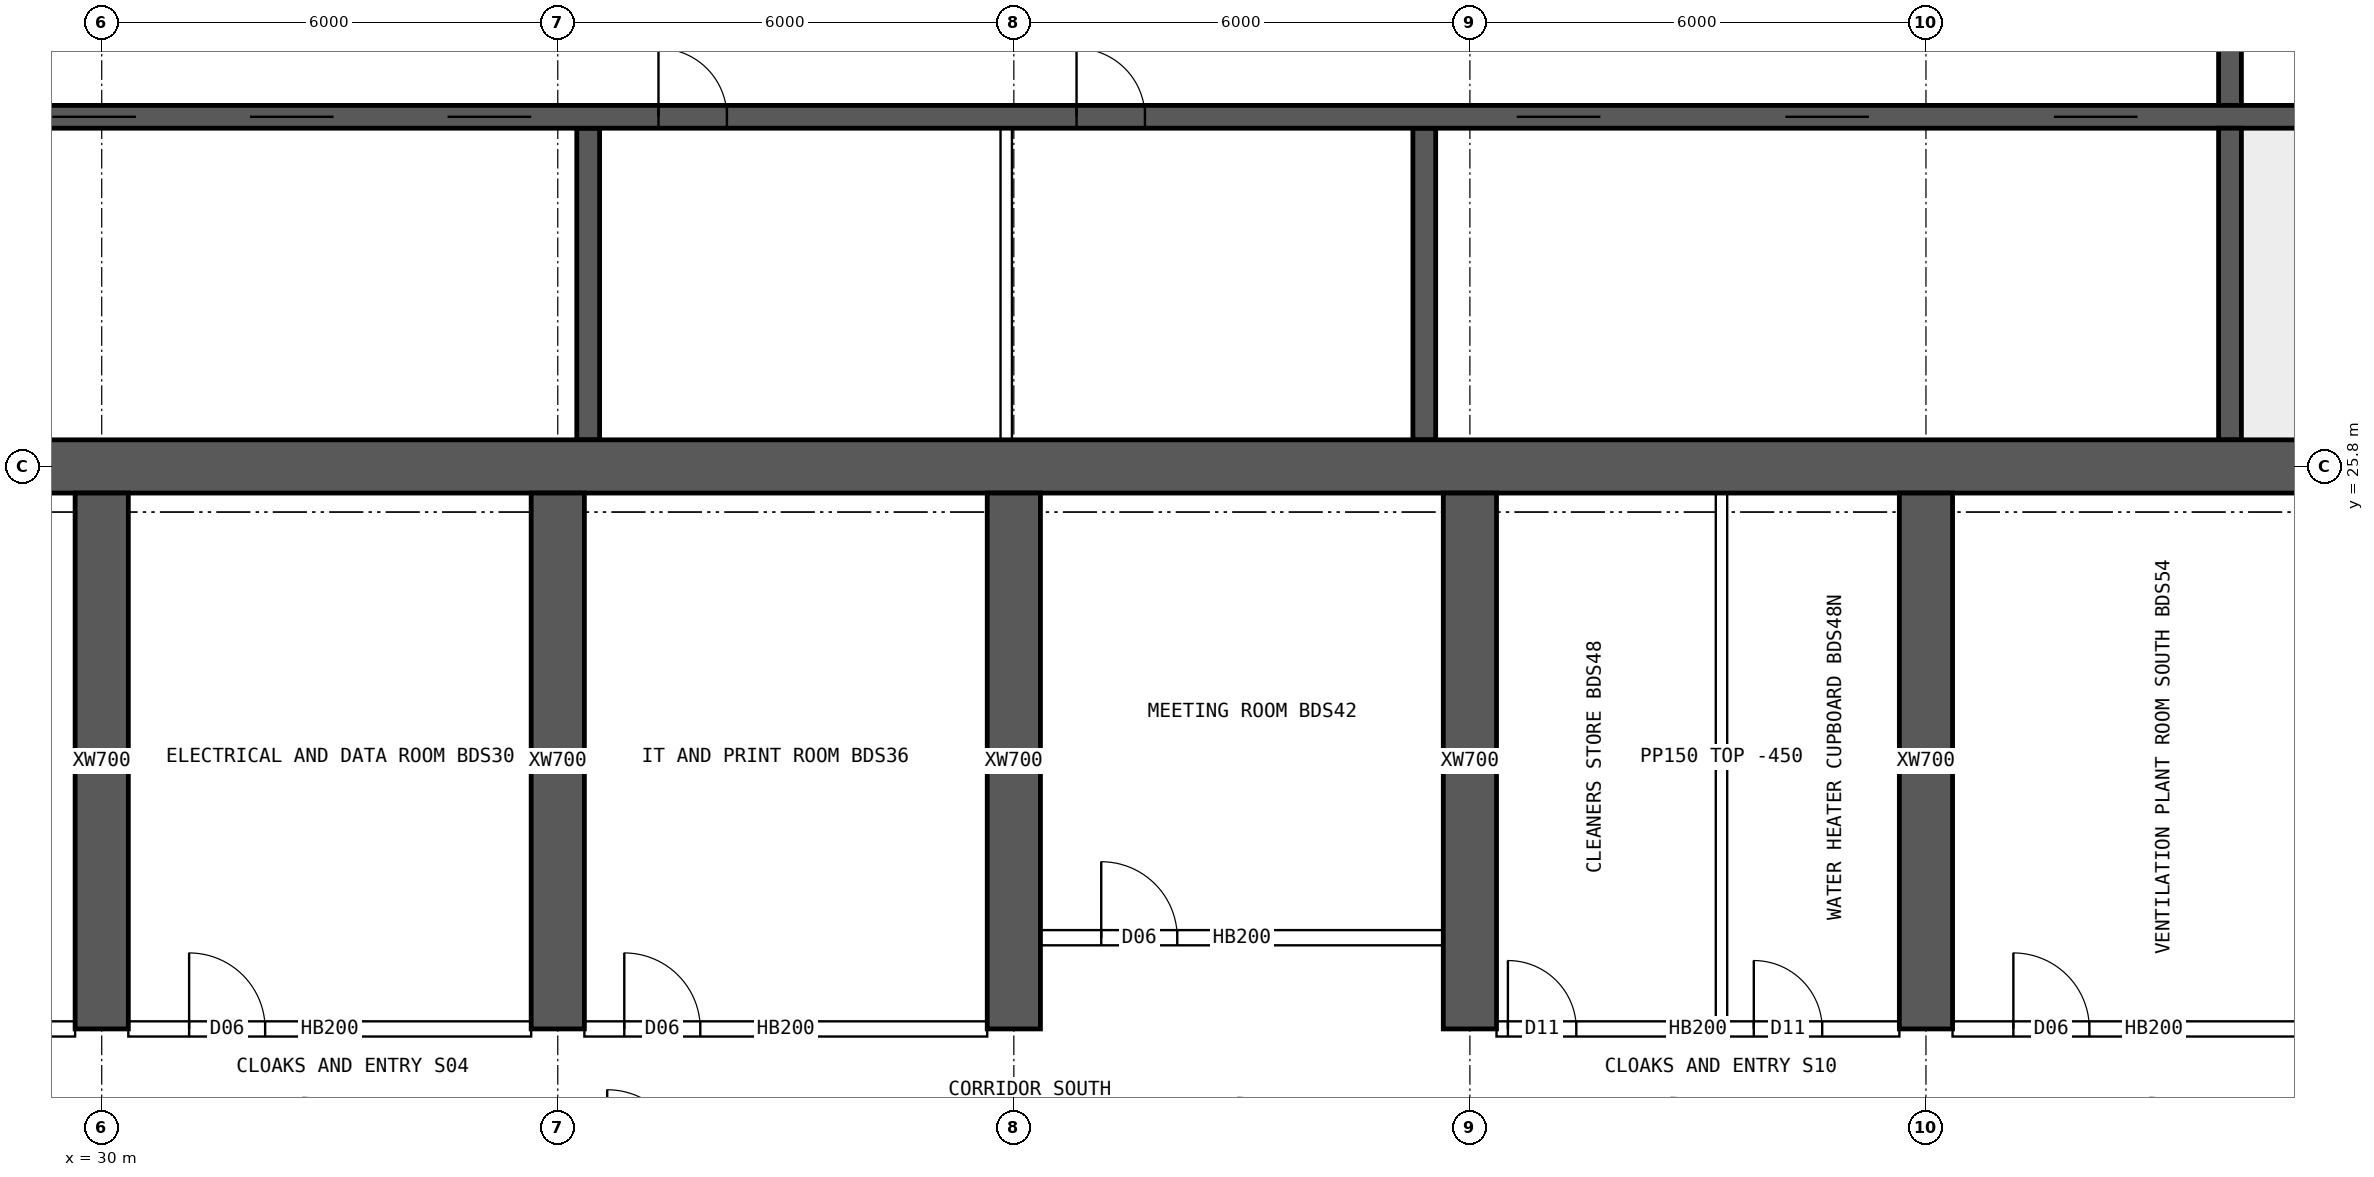
"""IFC4 building model, lengths in metres.
Left out: names, types, materials, properties, quantities, classifications, styles, units other than length and angle.
Written with IfcOpenShell. Run it as: python <this file> out.ifc"""

import sys

from ifc_helpers import new_model, si_unit, direction, frame, frame_2d, origin, place, context, subcontext, project, spatial, rectangle, extrude, element, fill, save


model = new_model("IFC4")
c1 = context("Model", 3, precision=1e-05, world=origin(), true_north=direction((0.0, 1.0)))
c2 = subcontext(c1, "Body", "Model", "MODEL_VIEW")
j1 = project(units=[si_unit("LENGTHUNIT", "METRE"), si_unit("PLANEANGLEUNIT", "RADIAN")], contexts=[c1])
p1 = place(None, origin())
s1 = spatial("IfcSite", under=j1, at=p1, CompositionType="ELEMENT")
p2 = place(p1, origin())
s2 = spatial("IfcBuilding", under=s1, at=p2, CompositionType="ELEMENT")
p3 = place(p2, frame((0.0, 0.0, 227.8)))
s3 = spatial("IfcBuildingStorey", under=s2, at=p3, CompositionType="ELEMENT", Elevation=227.8)
p4 = place(p3, frame((18.0, 25.8, 0.0), z_axis=(0.0, 0.0, 1.0), x_axis=(1.0, 0.0, 0.0)))
e1 = element("IfcWall", 1, at=p4, inside=s3, PredefinedType="SHEAR", context=c2, shape_type="SweptSolid", body=[
    extrude(rectangle(XDim=48.0, YDim=0.7, at=frame_2d((24.0, 0.0))), origin(), (0.0, 0.0, 1.0), 3.75),
])
p5 = place(p3, frame((18.35, 30.4, 0.0), z_axis=(0.0, 0.0, 1.0), x_axis=(1.0, 0.0, 0.0)))
e2 = element("IfcWall", 2, at=p5, inside=s3, PredefinedType="SHEAR", context=c2, shape_type="SweptSolid", body=[
    extrude(rectangle(XDim=47.3, YDim=0.3, at=frame_2d((23.65, 0.0))), origin(), (0.0, 0.0, 1.0), 3.75),
])
p6 = place(p5, frame((0.4, 0.0, 0.0)))
e3 = element("IfcOpeningElement", 3, at=p6, cuts=e2, PredefinedType="OPENING", context=c2, shape_type="SweptSolid", body=[
    extrude(rectangle(XDim=1.0, YDim=2.1, at=frame_2d((0.5, 1.05))), frame((0.0, 0.16, 0.0), z_axis=(0.0, -1.0, 0.0), x_axis=(1.0, 0.0, 0.0)), (0.0, 0.0, 1.0), 0.32),
])
p7 = place(p5, frame((45.9, 0.0, 0.0)))
e4 = element("IfcOpeningElement", 4, at=p7, cuts=e2, PredefinedType="OPENING", context=c2, shape_type="SweptSolid", body=[
    extrude(rectangle(XDim=1.0, YDim=2.1, at=frame_2d((0.5, 1.05))), frame((0.0, 0.16, 0.0), z_axis=(0.0, -1.0, 0.0), x_axis=(1.0, 0.0, 0.0)), (0.0, 0.0, 1.0), 0.32),
])
p8 = place(p5, frame((8.4, 0.0, 0.0)))
e5 = element("IfcOpeningElement", 5, at=p8, cuts=e2, PredefinedType="OPENING", context=c2, shape_type="SweptSolid", body=[
    extrude(rectangle(XDim=1.1, YDim=2.1, at=frame_2d((0.55, 1.05))), frame((0.0, 0.16, 0.0), z_axis=(0.0, -1.0, 0.0), x_axis=(1.0, 0.0, 0.0)), (0.0, 0.0, 1.0), 0.32),
])
p9 = place(p5, frame((11.0, 0.0, 0.0)))
e6 = element("IfcOpeningElement", 6, at=p9, cuts=e2, PredefinedType="OPENING", context=c2, shape_type="SweptSolid", body=[
    extrude(rectangle(XDim=1.1, YDim=2.1, at=frame_2d((0.55, 1.05))), frame((0.0, 0.16, 0.0), z_axis=(0.0, -1.0, 0.0), x_axis=(1.0, 0.0, 0.0)), (0.0, 0.0, 1.0), 0.32),
])
p10 = place(p5, frame((13.6, 0.0, 0.0)))
e7 = element("IfcOpeningElement", 7, at=p10, cuts=e2, PredefinedType="OPENING", context=c2, shape_type="SweptSolid", body=[
    extrude(rectangle(XDim=1.1, YDim=2.1, at=frame_2d((0.55, 1.05))), frame((0.0, 0.16, 0.0), z_axis=(0.0, -1.0, 0.0), x_axis=(1.0, 0.0, 0.0)), (0.0, 0.0, 1.0), 0.32),
])
p11 = place(p5, frame((16.2, 0.0, 0.0)))
e8 = element("IfcOpeningElement", 8, at=p11, cuts=e2, PredefinedType="OPENING", context=c2, shape_type="SweptSolid", body=[
    extrude(rectangle(XDim=1.1, YDim=2.1, at=frame_2d((0.55, 1.05))), frame((0.0, 0.16, 0.0), z_axis=(0.0, -1.0, 0.0), x_axis=(1.0, 0.0, 0.0)), (0.0, 0.0, 1.0), 0.32),
])
p12 = place(p5, frame((18.975, 0.0, 0.0)))
e9 = element("IfcOpeningElement", 9, at=p12, cuts=e2, PredefinedType="OPENING", context=c2, shape_type="SweptSolid", body=[
    extrude(rectangle(XDim=0.9, YDim=2.1, at=frame_2d((0.45, 1.05))), frame((0.0, 0.16, 0.0), z_axis=(0.0, -1.0, 0.0), x_axis=(1.0, 0.0, 0.0)), (0.0, 0.0, 1.0), 0.32),
])
p13 = place(p5, frame((24.475, 0.0, 0.0)))
e10 = element("IfcOpeningElement", 10, at=p13, cuts=e2, PredefinedType="OPENING", context=c2, shape_type="SweptSolid", body=[
    extrude(rectangle(XDim=0.9, YDim=2.1, at=frame_2d((0.45, 1.05))), frame((0.0, 0.16, 0.0), z_axis=(0.0, -1.0, 0.0), x_axis=(1.0, 0.0, 0.0)), (0.0, 0.0, 1.0), 0.32),
])
p14 = place(p5, frame((30.267, 0.0, 0.0)))
e11 = element("IfcOpeningElement", 11, at=p14, cuts=e2, PredefinedType="OPENING", context=c2, shape_type="SweptSolid", body=[
    extrude(rectangle(XDim=1.1, YDim=2.1, at=frame_2d((0.55, 1.05))), frame((0.0, 0.16, 0.0), z_axis=(0.0, -1.0, 0.0), x_axis=(1.0, 0.0, 0.0)), (0.0, 0.0, 1.0), 0.32),
])
p15 = place(p5, frame((33.8, 0.0, 0.0)))
e12 = element("IfcOpeningElement", 12, at=p15, cuts=e2, PredefinedType="OPENING", context=c2, shape_type="SweptSolid", body=[
    extrude(rectangle(XDim=1.1, YDim=2.1, at=frame_2d((0.55, 1.05))), frame((0.0, 0.16, 0.0), z_axis=(0.0, -1.0, 0.0), x_axis=(1.0, 0.0, 0.0)), (0.0, 0.0, 1.0), 0.32),
])
p16 = place(p5, frame((37.333, 0.0, 0.0)))
e13 = element("IfcOpeningElement", 13, at=p16, cuts=e2, PredefinedType="OPENING", context=c2, shape_type="SweptSolid", body=[
    extrude(rectangle(XDim=1.1, YDim=2.1, at=frame_2d((0.55, 1.05))), frame((0.0, 0.16, 0.0), z_axis=(0.0, -1.0, 0.0), x_axis=(1.0, 0.0, 0.0)), (0.0, 0.0, 1.0), 0.32),
])
p17 = place(p3, frame((58.0, 26.15, 0.0), z_axis=(0.0, 0.0, 1.0), x_axis=(0.0, 1.0, 0.0)))
e14 = element("IfcWall", 14, at=p17, inside=s3, PredefinedType="SHEAR", context=c2, shape_type="SweptSolid", body=[
    extrude(rectangle(XDim=4.1, YDim=0.3, at=frame_2d((2.05, 0.0))), origin(), (0.0, 0.0, 1.0), 3.75),
])
p18 = place(p3, frame((58.0, 30.55, 0.0), z_axis=(0.0, 0.0, 1.0), x_axis=(0.0, 1.0, 0.0)))
e15 = element("IfcWall", 15, at=p18, inside=s3, PredefinedType="SHEAR", context=c2, shape_type="SweptSolid", body=[
    extrude(rectangle(XDim=3.9, YDim=0.3, at=frame_2d((1.95, 0.0))), origin(), (0.0, 0.0, 1.0), 3.75),
])
p19 = place(p18, frame((1.4, 0.0, 0.0)))
e16 = element("IfcOpeningElement", 16, at=p19, cuts=e15, PredefinedType="OPENING", context=c2, shape_type="SweptSolid", body=[
    extrude(rectangle(XDim=1.2, YDim=2.1, at=frame_2d((0.6, 1.05))), frame((0.0, 0.16, 0.0), z_axis=(0.0, -1.0, 0.0), x_axis=(1.0, 0.0, 0.0)), (0.0, 0.0, 1.0), 0.32),
])
for number, where, z_axis, x_axis in (
    (17, (36.4, 26.15, 0.0), (0.0, 0.0, 1.0), (0.0, 1.0, 0.0)),
    (18, (47.4, 26.15, 0.0), (0.0, 0.0, 1.0), (0.0, 1.0, 0.0)),
):
    element("IfcWall", number, at=place(p3, frame(where, z_axis=z_axis, x_axis=x_axis)), inside=s3, PredefinedType="SHEAR", context=c2, shape_type="SweptSolid", body=[
        extrude(rectangle(XDim=4.1, YDim=0.3, at=frame_2d((2.05, 0.0))), origin(), (0.0, 0.0, 1.0), 3.75),
    ])
for number, where, z_axis, x_axis in (
    (19, (30.0, 18.4, 0.0), (0.0, 0.0, 1.0), (0.0, 1.0, 0.0)),
    (20, (36.0, 18.4, 0.0), (0.0, 0.0, 1.0), (0.0, 1.0, 0.0)),
    (21, (42.0, 18.4, 0.0), (0.0, 0.0, 1.0), (0.0, 1.0, 0.0)),
    (22, (48.0, 18.4, 0.0), (0.0, 0.0, 1.0), (0.0, 1.0, 0.0)),
    (23, (54.0, 18.4, 0.0), (0.0, 0.0, 1.0), (0.0, 1.0, 0.0)),
):
    element("IfcWall", number, at=place(p3, frame(where, z_axis=z_axis, x_axis=x_axis)), inside=s3, PredefinedType="SHEAR", context=c2, shape_type="SweptSolid", body=[
        extrude(rectangle(XDim=7.05, YDim=0.7, at=frame_2d((3.525, 0.0))), origin(), (0.0, 0.0, 1.0), 3.75),
    ])
p20 = place(p3, frame((41.9, 26.15, 0.0), z_axis=(0.0, 0.0, 1.0), x_axis=(0.0, 1.0, 0.0)))
e24 = element("IfcWall", 24, at=p20, inside=s3, PredefinedType="SOLIDWALL", context=c2, shape_type="SweptSolid", body=[
    extrude(rectangle(XDim=4.1, YDim=0.15, at=frame_2d((2.05, 0.0))), origin(), (0.0, 0.0, 1.0), 3.3),
])
p21 = place(p3, frame((24.35, 18.4, 0.0), z_axis=(0.0, 0.0, 1.0), x_axis=(1.0, 0.0, 0.0)))
e25 = element("IfcWall", 25, at=p21, inside=s3, PredefinedType="SOLIDWALL", context=c2, shape_type="SweptSolid", body=[
    extrude(rectangle(XDim=5.3, YDim=0.2, at=frame_2d((2.65, 0.0))), origin(), (0.0, 0.0, 1.0), 3.3),
])
p22 = place(p21, frame((0.15, 0.0, 0.0)))
e26 = element("IfcOpeningElement", 26, at=p22, cuts=e25, PredefinedType="OPENING", context=c2, shape_type="SweptSolid", body=[
    extrude(rectangle(XDim=0.9, YDim=2.1, at=frame_2d((0.45, 1.05))), frame((0.0, 0.11, 0.0), z_axis=(0.0, -1.0, 0.0), x_axis=(1.0, 0.0, 0.0)), (0.0, 0.0, 1.0), 0.22),
])
p23 = place(p21, frame((2.22, 0.0, 0.0)))
e27 = element("IfcOpeningElement", 27, at=p23, cuts=e25, PredefinedType="OPENING", context=c2, shape_type="SweptSolid", body=[
    extrude(rectangle(XDim=0.9, YDim=2.1, at=frame_2d((0.45, 1.05))), frame((0.0, 0.11, 0.0), z_axis=(0.0, -1.0, 0.0), x_axis=(1.0, 0.0, 0.0)), (0.0, 0.0, 1.0), 0.22),
])
p24 = place(p3, frame((30.35, 18.4, 0.0), z_axis=(0.0, 0.0, 1.0), x_axis=(1.0, 0.0, 0.0)))
e28 = element("IfcWall", 28, at=p24, inside=s3, PredefinedType="SOLIDWALL", context=c2, shape_type="SweptSolid", body=[
    extrude(rectangle(XDim=5.3, YDim=0.2, at=frame_2d((2.65, 0.0))), origin(), (0.0, 0.0, 1.0), 3.3),
])
p25 = place(p24, frame((0.8, 0.0, 0.0)))
e29 = element("IfcOpeningElement", 29, at=p25, cuts=e28, PredefinedType="OPENING", context=c2, shape_type="SweptSolid", body=[
    extrude(rectangle(XDim=1.0, YDim=2.1, at=frame_2d((0.5, 1.05))), frame((0.0, 0.11, 0.0), z_axis=(0.0, -1.0, 0.0), x_axis=(1.0, 0.0, 0.0)), (0.0, 0.0, 1.0), 0.22),
])
p26 = place(p3, frame((36.35, 18.4, 0.0), z_axis=(0.0, 0.0, 1.0), x_axis=(1.0, 0.0, 0.0)))
e30 = element("IfcWall", 30, at=p26, inside=s3, PredefinedType="SOLIDWALL", context=c2, shape_type="SweptSolid", body=[
    extrude(rectangle(XDim=5.3, YDim=0.2, at=frame_2d((2.65, 0.0))), origin(), (0.0, 0.0, 1.0), 3.3),
])
p27 = place(p26, frame((0.525, 0.0, 0.0)))
e31 = element("IfcOpeningElement", 31, at=p27, cuts=e30, PredefinedType="OPENING", context=c2, shape_type="SweptSolid", body=[
    extrude(rectangle(XDim=1.0, YDim=2.1, at=frame_2d((0.5, 1.05))), frame((0.0, 0.11, 0.0), z_axis=(0.0, -1.0, 0.0), x_axis=(1.0, 0.0, 0.0)), (0.0, 0.0, 1.0), 0.22),
])
p28 = place(p3, frame((48.35, 18.4, 0.0), z_axis=(0.0, 0.0, 1.0), x_axis=(1.0, 0.0, 0.0)))
e32 = element("IfcWall", 32, at=p28, inside=s3, PredefinedType="SOLIDWALL", context=c2, shape_type="SweptSolid", body=[
    extrude(rectangle(XDim=5.3, YDim=0.2, at=frame_2d((2.65, 0.0))), origin(), (0.0, 0.0, 1.0), 3.3),
])
p29 = place(p28, frame((0.15, 0.0, 0.0)))
e33 = element("IfcOpeningElement", 33, at=p29, cuts=e32, PredefinedType="OPENING", context=c2, shape_type="SweptSolid", body=[
    extrude(rectangle(XDim=0.9, YDim=2.1, at=frame_2d((0.45, 1.05))), frame((0.0, 0.11, 0.0), z_axis=(0.0, -1.0, 0.0), x_axis=(1.0, 0.0, 0.0)), (0.0, 0.0, 1.0), 0.22),
])
p30 = place(p28, frame((3.385, 0.0, 0.0)))
e34 = element("IfcOpeningElement", 34, at=p30, cuts=e32, PredefinedType="OPENING", context=c2, shape_type="SweptSolid", body=[
    extrude(rectangle(XDim=0.9, YDim=2.1, at=frame_2d((0.45, 1.05))), frame((0.0, 0.11, 0.0), z_axis=(0.0, -1.0, 0.0), x_axis=(1.0, 0.0, 0.0)), (0.0, 0.0, 1.0), 0.22),
])
p31 = place(p3, frame((54.35, 18.4, 0.0), z_axis=(0.0, 0.0, 1.0), x_axis=(1.0, 0.0, 0.0)))
e35 = element("IfcWall", 35, at=p31, inside=s3, PredefinedType="SOLIDWALL", context=c2, shape_type="SweptSolid", body=[
    extrude(rectangle(XDim=5.3, YDim=0.2, at=frame_2d((2.65, 0.0))), origin(), (0.0, 0.0, 1.0), 3.3),
])
p32 = place(p31, frame((0.8, 0.0, 0.0)))
e36 = element("IfcOpeningElement", 36, at=p32, cuts=e35, PredefinedType="OPENING", context=c2, shape_type="SweptSolid", body=[
    extrude(rectangle(XDim=1.0, YDim=2.1, at=frame_2d((0.5, 1.05))), frame((0.0, 0.11, 0.0), z_axis=(0.0, -1.0, 0.0), x_axis=(1.0, 0.0, 0.0)), (0.0, 0.0, 1.0), 0.22),
])
p33 = place(p3, frame((42.35, 19.6, 0.0), z_axis=(0.0, 0.0, 1.0), x_axis=(1.0, 0.0, 0.0)))
e37 = element("IfcWall", 37, at=p33, inside=s3, PredefinedType="SOLIDWALL", context=c2, shape_type="SweptSolid", body=[
    extrude(rectangle(XDim=5.3, YDim=0.2, at=frame_2d((2.65, 0.0))), origin(), (0.0, 0.0, 1.0), 3.3),
])
p34 = place(p33, frame((0.8, 0.0, 0.0)))
e38 = element("IfcOpeningElement", 38, at=p34, cuts=e37, PredefinedType="OPENING", context=c2, shape_type="SweptSolid", body=[
    extrude(rectangle(XDim=1.0, YDim=2.1, at=frame_2d((0.5, 1.05))), frame((0.0, 0.11, 0.0), z_axis=(0.0, -1.0, 0.0), x_axis=(1.0, 0.0, 0.0)), (0.0, 0.0, 1.0), 0.22),
])
p35 = place(p3, frame((51.31, 18.5, 0.0), z_axis=(0.0, 0.0, 1.0), x_axis=(0.0, 1.0, 0.0)))
e39 = element("IfcWall", 39, at=p35, inside=s3, PredefinedType="PARTITIONING", context=c2, shape_type="SweptSolid", body=[
    extrude(rectangle(XDim=6.95, YDim=0.15, at=frame_2d((3.475, 0.0))), origin(), (0.0, 0.0, 1.0), 3.3),
])
p36 = place(p9, origin())
e40 = element("IfcDoor", 40, at=p36, inside=s3, OperationType="DOUBLE_DOOR_SLIDING", PredefinedType="DOOR", context=c2, shape_type="SweptSolid", body=[
    extrude(rectangle(XDim=1.1, YDim=2.1, at=frame_2d((0.55, 1.05))), frame((0.0, 0.025, 0.0), z_axis=(0.0, -1.0, 0.0), x_axis=(1.0, 0.0, 0.0)), (0.0, 0.0, 1.0), 0.05),
])
fill(e6, e40)
p37 = place(p10, origin())
e41 = element("IfcDoor", 41, at=p37, inside=s3, OperationType="DOUBLE_DOOR_SLIDING", PredefinedType="DOOR", context=c2, shape_type="SweptSolid", body=[
    extrude(rectangle(XDim=1.1, YDim=2.1, at=frame_2d((0.55, 1.05))), frame((0.0, 0.025, 0.0), z_axis=(0.0, -1.0, 0.0), x_axis=(1.0, 0.0, 0.0)), (0.0, 0.0, 1.0), 0.05),
])
fill(e7, e41)
p38 = place(p11, origin())
e42 = element("IfcDoor", 42, at=p38, inside=s3, OperationType="DOUBLE_DOOR_SLIDING", PredefinedType="DOOR", context=c2, shape_type="SweptSolid", body=[
    extrude(rectangle(XDim=1.1, YDim=2.1, at=frame_2d((0.55, 1.05))), frame((0.0, 0.025, 0.0), z_axis=(0.0, -1.0, 0.0), x_axis=(1.0, 0.0, 0.0)), (0.0, 0.0, 1.0), 0.05),
])
fill(e8, e42)
p39 = place(p12, origin())
e43 = element("IfcDoor", 43, at=p39, inside=s3, OperationType="SINGLE_SWING_LEFT", PredefinedType="DOOR", context=c2, shape_type="SweptSolid", body=[
    extrude(rectangle(XDim=0.9, YDim=2.1, at=frame_2d((0.45, 1.05))), frame((0.0, 0.025, 0.0), z_axis=(0.0, -1.0, 0.0), x_axis=(1.0, 0.0, 0.0)), (0.0, 0.0, 1.0), 0.05),
])
fill(e9, e43)
p40 = place(p13, origin())
e44 = element("IfcDoor", 44, at=p40, inside=s3, OperationType="SINGLE_SWING_LEFT", PredefinedType="DOOR", context=c2, shape_type="SweptSolid", body=[
    extrude(rectangle(XDim=0.9, YDim=2.1, at=frame_2d((0.45, 1.05))), frame((0.0, 0.025, 0.0), z_axis=(0.0, -1.0, 0.0), x_axis=(1.0, 0.0, 0.0)), (0.0, 0.0, 1.0), 0.05),
])
fill(e10, e44)
p41 = place(p14, origin())
e45 = element("IfcDoor", 45, at=p41, inside=s3, OperationType="DOUBLE_DOOR_SLIDING", PredefinedType="DOOR", context=c2, shape_type="SweptSolid", body=[
    extrude(rectangle(XDim=1.1, YDim=2.1, at=frame_2d((0.55, 1.05))), frame((0.0, 0.025, 0.0), z_axis=(0.0, -1.0, 0.0), x_axis=(1.0, 0.0, 0.0)), (0.0, 0.0, 1.0), 0.05),
])
fill(e11, e45)
p42 = place(p15, origin())
e46 = element("IfcDoor", 46, at=p42, inside=s3, OperationType="DOUBLE_DOOR_SLIDING", PredefinedType="DOOR", context=c2, shape_type="SweptSolid", body=[
    extrude(rectangle(XDim=1.1, YDim=2.1, at=frame_2d((0.55, 1.05))), frame((0.0, 0.025, 0.0), z_axis=(0.0, -1.0, 0.0), x_axis=(1.0, 0.0, 0.0)), (0.0, 0.0, 1.0), 0.05),
])
fill(e12, e46)
p43 = place(p16, origin())
e47 = element("IfcDoor", 47, at=p43, inside=s3, OperationType="DOUBLE_DOOR_SLIDING", PredefinedType="DOOR", context=c2, shape_type="SweptSolid", body=[
    extrude(rectangle(XDim=1.1, YDim=2.1, at=frame_2d((0.55, 1.05))), frame((0.0, 0.025, 0.0), z_axis=(0.0, -1.0, 0.0), x_axis=(1.0, 0.0, 0.0)), (0.0, 0.0, 1.0), 0.05),
])
fill(e13, e47)
p44 = place(p25, origin())
e48 = element("IfcDoor", 48, at=p44, inside=s3, OperationType="SINGLE_SWING_LEFT", PredefinedType="DOOR", context=c2, shape_type="SweptSolid", body=[
    extrude(rectangle(XDim=1.0, YDim=2.1, at=frame_2d((0.5, 1.05))), frame((0.0, 0.025, 0.0), z_axis=(0.0, -1.0, 0.0), x_axis=(1.0, 0.0, 0.0)), (0.0, 0.0, 1.0), 0.05),
])
fill(e29, e48)
p45 = place(p27, origin())
e49 = element("IfcDoor", 49, at=p45, inside=s3, OperationType="SINGLE_SWING_LEFT", PredefinedType="DOOR", context=c2, shape_type="SweptSolid", body=[
    extrude(rectangle(XDim=1.0, YDim=2.1, at=frame_2d((0.5, 1.05))), frame((0.0, 0.025, 0.0), z_axis=(0.0, -1.0, 0.0), x_axis=(1.0, 0.0, 0.0)), (0.0, 0.0, 1.0), 0.05),
])
fill(e31, e49)
p46 = place(p34, origin())
e50 = element("IfcDoor", 50, at=p46, inside=s3, OperationType="SINGLE_SWING_LEFT", PredefinedType="DOOR", context=c2, shape_type="SweptSolid", body=[
    extrude(rectangle(XDim=1.0, YDim=2.1, at=frame_2d((0.5, 1.05))), frame((0.0, 0.025, 0.0), z_axis=(0.0, -1.0, 0.0), x_axis=(1.0, 0.0, 0.0)), (0.0, 0.0, 1.0), 0.05),
])
fill(e38, e50)
p47 = place(p29, origin())
e51 = element("IfcDoor", 51, at=p47, inside=s3, OperationType="SINGLE_SWING_LEFT", PredefinedType="DOOR", context=c2, shape_type="SweptSolid", body=[
    extrude(rectangle(XDim=0.9, YDim=2.1, at=frame_2d((0.45, 1.05))), frame((0.0, 0.025, 0.0), z_axis=(0.0, -1.0, 0.0), x_axis=(1.0, 0.0, 0.0)), (0.0, 0.0, 1.0), 0.05),
])
fill(e33, e51)
p48 = place(p30, origin())
e52 = element("IfcDoor", 52, at=p48, inside=s3, OperationType="SINGLE_SWING_LEFT", PredefinedType="DOOR", context=c2, shape_type="SweptSolid", body=[
    extrude(rectangle(XDim=0.9, YDim=2.1, at=frame_2d((0.45, 1.05))), frame((0.0, 0.025, 0.0), z_axis=(0.0, -1.0, 0.0), x_axis=(1.0, 0.0, 0.0)), (0.0, 0.0, 1.0), 0.05),
])
fill(e34, e52)
p49 = place(p32, origin())
e53 = element("IfcDoor", 53, at=p49, inside=s3, OperationType="SINGLE_SWING_LEFT", PredefinedType="DOOR", context=c2, shape_type="SweptSolid", body=[
    extrude(rectangle(XDim=1.0, YDim=2.1, at=frame_2d((0.5, 1.05))), frame((0.0, 0.025, 0.0), z_axis=(0.0, -1.0, 0.0), x_axis=(1.0, 0.0, 0.0)), (0.0, 0.0, 1.0), 0.05),
])
fill(e36, e53)
save(model, sys.argv[1])
